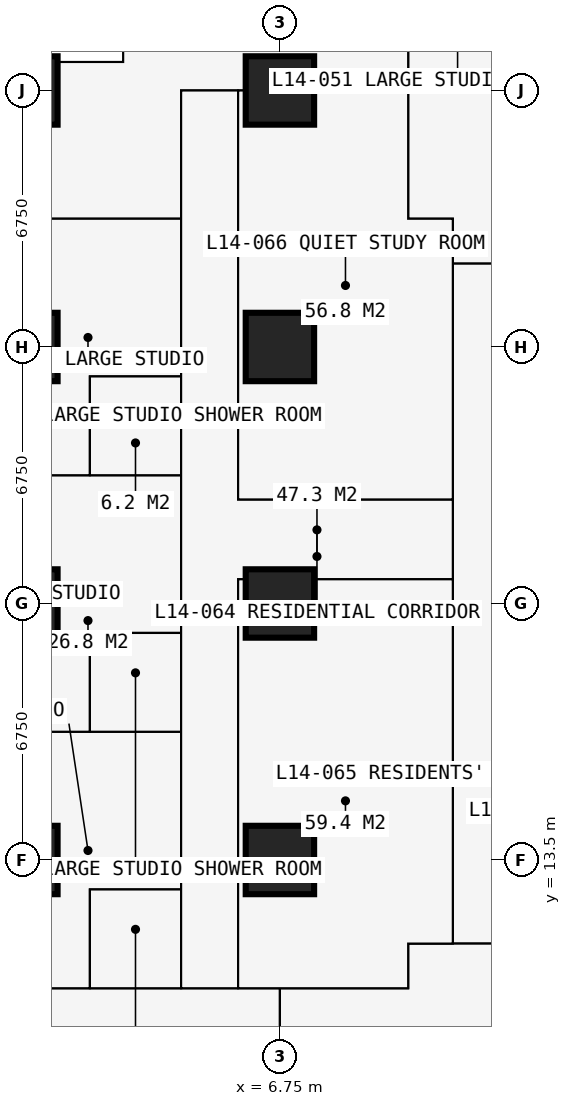
"""IFC4 building model, lengths in metres.
Left out: names, types, materials, properties, quantities, classifications, styles, units other than length and angle.
Written with IfcOpenShell. Run it as: python <this file> out.ifc"""

import sys

from ifc_helpers import new_model, si_unit, direction, frame, frame_2d, origin, origin_2d, place, context, subcontext, project, spatial, rectangle, extrude, element, fill, save


model = new_model("IFC4")
c1 = context("Model", 3, precision=1e-05, world=origin(), true_north=direction((0.0, 1.0)))
c2 = subcontext(c1, "Body", "Model", "MODEL_VIEW")
j1 = project(units=[si_unit("LENGTHUNIT", "METRE"), si_unit("PLANEANGLEUNIT", "RADIAN")], contexts=[c1])
p1 = place(None, origin())
s1 = spatial("IfcSite", under=j1, at=p1, CompositionType="ELEMENT")
p2 = place(p1, origin())
s2 = spatial("IfcBuilding", under=s1, at=p2, CompositionType="ELEMENT")
p3 = place(p2, frame((0.0, 0.0, 54.0)))
s3 = spatial("IfcBuildingStorey", under=s2, at=p3, CompositionType="ELEMENT", Elevation=54.0)
for number, where, z_axis, x_axis in (
    (1, (0.0, 13.5, 0.0), (0.0, 0.0, 1.0), (1.0, 0.0, 0.0)),
    (2, (0.0, 20.25, 0.0), (0.0, 0.0, 1.0), (1.0, 0.0, 0.0)),
    (3, (0.0, 27.0, 0.0), (0.0, 0.0, 1.0), (1.0, 0.0, 0.0)),
    (4, (0.0, 33.75, 0.0), (0.0, 0.0, 1.0), (1.0, 0.0, 0.0)),
    (5, (6.75, 13.5, 0.0), (0.0, 0.0, 1.0), (1.0, 0.0, 0.0)),
    (6, (6.75, 20.25, 0.0), (0.0, 0.0, 1.0), (1.0, 0.0, 0.0)),
    (7, (6.75, 27.0, 0.0), (0.0, 0.0, 1.0), (1.0, 0.0, 0.0)),
    (8, (6.75, 33.75, 0.0), (0.0, 0.0, 1.0), (1.0, 0.0, 0.0)),
):
    element("IfcColumn", number, at=place(p3, frame(where, z_axis=z_axis, x_axis=x_axis)), inside=s3, PredefinedType="COLUMN", context=c2, shape_type="SweptSolid", body=[
        extrude(rectangle(XDim=1.8, YDim=1.8, at=origin_2d()), origin(), (0.0, 0.0, 1.0), 3.6),
    ])
p4 = place(p3, frame((2.625, 37.875, 0.0), z_axis=(0.0, 0.0, 1.0), x_axis=(0.0, -1.0, 0.0)))
e9 = element("IfcWall", 9, at=p4, inside=s3, PredefinedType="SOLIDWALL", context=c2, shape_type="SweptSolid", body=[
    extrude(rectangle(XDim=3.375, YDim=0.3, at=frame_2d((1.688, 0.0))), origin(), (0.0, 0.0, 1.0), 3.375),
])
p5 = place(p4, frame((0.788, 0.0, 0.6)))
e10 = element("IfcOpeningElement", 10, at=p5, cuts=e9, PredefinedType="OPENING", context=c2, shape_type="SweptSolid", body=[
    extrude(rectangle(XDim=1.8, YDim=2.1, at=frame_2d((0.9, 1.05))), frame((0.0, 0.16, 0.0), z_axis=(0.0, -1.0, 0.0), x_axis=(1.0, 0.0, 0.0)), (0.0, 0.0, 1.0), 0.32),
])
p6 = place(p3, frame((2.625, 34.5, 0.0), z_axis=(0.0, 0.0, 1.0), x_axis=(-1.0, 0.0, 0.0)))
e11 = element("IfcWall", 11, at=p6, inside=s3, PredefinedType="SOLIDWALL", context=c2, shape_type="SweptSolid", body=[
    extrude(rectangle(XDim=3.375, YDim=0.3, at=frame_2d((1.688, 0.0))), origin(), (0.0, 0.0, 1.0), 3.375),
])
p7 = place(p6, frame((0.343, 0.0, 0.9)))
e12 = element("IfcOpeningElement", 12, at=p7, cuts=e11, PredefinedType="OPENING", context=c2, shape_type="SweptSolid", body=[
    extrude(rectangle(XDim=1.2, YDim=1.8, at=frame_2d((0.6, 0.9))), frame((0.0, 0.16, 0.0), z_axis=(0.0, -1.0, 0.0), x_axis=(1.0, 0.0, 0.0)), (0.0, 0.0, 1.0), 0.32),
])
p8 = place(p3, frame((-0.734, 10.125, 0.0), z_axis=(0.0, 0.0, 1.0), x_axis=(1.0, 0.0, 0.0)))
e13 = element("IfcWall", 13, at=p8, inside=s3, PredefinedType="PARTITIONING", context=c2, shape_type="SweptSolid", body=[
    extrude(rectangle(XDim=10.859, YDim=0.15, at=frame_2d((5.429, 0.0))), origin(), (0.0, 0.0, 1.0), 3.375),
])
p9 = place(p8, frame((5.134, 0.0, 0.0)))
e14 = element("IfcOpeningElement", 14, at=p9, cuts=e13, PredefinedType="OPENING", context=c2, shape_type="SweptSolid", body=[
    extrude(rectangle(XDim=1.0, YDim=2.2, at=frame_2d((0.5, 1.1))), frame((0.0, 0.085, 0.0), z_axis=(0.0, -1.0, 0.0), x_axis=(1.0, 0.0, 0.0)), (0.0, 0.0, 1.0), 0.17),
])
p10 = place(p3, frame((-0.734, 16.875, 0.0), z_axis=(0.0, 0.0, 1.0), x_axis=(1.0, 0.0, 0.0)))
e15 = element("IfcWall", 15, at=p10, inside=s3, PredefinedType="PARTITIONING", context=c2, shape_type="SweptSolid", body=[
    extrude(rectangle(XDim=4.884, YDim=0.175, at=frame_2d((2.442, 0.0))), origin(), (0.0, 0.0, 1.0), 3.375),
])
p11 = place(p10, frame((3.234, 0.0, 0.0)))
e16 = element("IfcOpeningElement", 16, at=p11, cuts=e15, PredefinedType="OPENING", context=c2, shape_type="SweptSolid", body=[
    extrude(rectangle(XDim=0.9, YDim=2.2, at=frame_2d((0.45, 1.1))), frame((0.0, 0.097, 0.0), z_axis=(0.0, -1.0, 0.0), x_axis=(1.0, 0.0, 0.0)), (0.0, 0.0, 1.0), 0.195),
])
p12 = place(p3, frame((-0.734, 23.625, 0.0), z_axis=(0.0, 0.0, 1.0), x_axis=(1.0, 0.0, 0.0)))
e17 = element("IfcWall", 17, at=p12, inside=s3, PredefinedType="PARTITIONING", context=c2, shape_type="SweptSolid", body=[
    extrude(rectangle(XDim=4.884, YDim=0.175, at=frame_2d((2.442, 0.0))), origin(), (0.0, 0.0, 1.0), 3.375),
])
p13 = place(p12, frame((3.234, 0.0, 0.0)))
e18 = element("IfcOpeningElement", 18, at=p13, cuts=e17, PredefinedType="OPENING", context=c2, shape_type="SweptSolid", body=[
    extrude(rectangle(XDim=0.9, YDim=2.2, at=frame_2d((0.45, 1.1))), frame((0.0, 0.097, 0.0), z_axis=(0.0, -1.0, 0.0), x_axis=(1.0, 0.0, 0.0)), (0.0, 0.0, 1.0), 0.195),
])
p14 = place(p3, frame((-0.734, 30.375, 0.0), z_axis=(0.0, 0.0, 1.0), x_axis=(1.0, 0.0, 0.0)))
e19 = element("IfcWall", 19, at=p14, inside=s3, PredefinedType="PARTITIONING", context=c2, shape_type="SweptSolid", body=[
    extrude(rectangle(XDim=4.884, YDim=0.15, at=frame_2d((2.442, 0.0))), origin(), (0.0, 0.0, 1.0), 3.375),
])
p15 = place(p3, frame((1.75, 10.125, 0.0), z_axis=(0.0, 0.0, 1.0), x_axis=(0.0, 1.0, 0.0)))
e20 = element("IfcWall", 20, at=p15, inside=s3, PredefinedType="PARTITIONING", context=c2, shape_type="SweptSolid", body=[
    extrude(rectangle(XDim=2.6, YDim=0.1, at=frame_2d((1.3, 0.0))), origin(), (0.0, 0.0, 1.0), 3.375),
])
p16 = place(p15, frame((0.85, 0.0, 0.0)))
e21 = element("IfcOpeningElement", 21, at=p16, cuts=e20, PredefinedType="OPENING", context=c2, shape_type="SweptSolid", body=[
    extrude(rectangle(XDim=0.9, YDim=2.2, at=frame_2d((0.45, 1.1))), frame((0.0, 0.06, 0.0), z_axis=(0.0, -1.0, 0.0), x_axis=(1.0, 0.0, 0.0)), (0.0, 0.0, 1.0), 0.12),
])
p17 = place(p3, frame((1.75, 12.725, 0.0), z_axis=(0.0, 0.0, 1.0), x_axis=(1.0, 0.0, 0.0)))
e22 = element("IfcWall", 22, at=p17, inside=s3, PredefinedType="PARTITIONING", context=c2, shape_type="SweptSolid", body=[
    extrude(rectangle(XDim=2.4, YDim=0.1, at=frame_2d((1.2, 0.0))), origin(), (0.0, 0.0, 1.0), 3.375),
])
p18 = place(p3, frame((1.75, 16.875, 0.0), z_axis=(0.0, 0.0, 1.0), x_axis=(0.0, 1.0, 0.0)))
e23 = element("IfcWall", 23, at=p18, inside=s3, PredefinedType="PARTITIONING", context=c2, shape_type="SweptSolid", body=[
    extrude(rectangle(XDim=2.6, YDim=0.1, at=frame_2d((1.3, 0.0))), origin(), (0.0, 0.0, 1.0), 3.375),
])
p19 = place(p3, frame((1.75, 19.475, 0.0), z_axis=(0.0, 0.0, 1.0), x_axis=(1.0, 0.0, 0.0)))
e24 = element("IfcWall", 24, at=p19, inside=s3, PredefinedType="PARTITIONING", context=c2, shape_type="SweptSolid", body=[
    extrude(rectangle(XDim=2.4, YDim=0.1, at=frame_2d((1.2, 0.0))), origin(), (0.0, 0.0, 1.0), 3.375),
])
p20 = place(p3, frame((1.75, 23.625, 0.0), z_axis=(0.0, 0.0, 1.0), x_axis=(0.0, 1.0, 0.0)))
e25 = element("IfcWall", 25, at=p20, inside=s3, PredefinedType="PARTITIONING", context=c2, shape_type="SweptSolid", body=[
    extrude(rectangle(XDim=2.6, YDim=0.1, at=frame_2d((1.3, 0.0))), origin(), (0.0, 0.0, 1.0), 3.375),
])
p21 = place(p3, frame((1.75, 26.225, 0.0), z_axis=(0.0, 0.0, 1.0), x_axis=(1.0, 0.0, 0.0)))
e26 = element("IfcWall", 26, at=p21, inside=s3, PredefinedType="PARTITIONING", context=c2, shape_type="SweptSolid", body=[
    extrude(rectangle(XDim=2.4, YDim=0.1, at=frame_2d((1.2, 0.0))), origin(), (0.0, 0.0, 1.0), 3.375),
])
p22 = place(p3, frame((4.15, 10.125, 0.0), z_axis=(0.0, 0.0, 1.0), x_axis=(0.0, 1.0, 0.0)))
e27 = element("IfcWall", 27, at=p22, inside=s3, PredefinedType="PARTITIONING", context=c2, shape_type="SweptSolid", body=[
    extrude(rectangle(XDim=23.625, YDim=0.15, at=frame_2d((11.812, 0.0))), origin(), (0.0, 0.0, 1.0), 3.375),
])
p23 = place(p22, frame((4.2, 0.0, 0.0)))
e28 = element("IfcOpeningElement", 28, at=p23, cuts=e27, PredefinedType="OPENING", context=c2, shape_type="SweptSolid", body=[
    extrude(rectangle(XDim=0.95, YDim=2.2, at=frame_2d((0.475, 1.1))), frame((0.0, 0.085, 0.0), z_axis=(0.0, -1.0, 0.0), x_axis=(1.0, 0.0, 0.0)), (0.0, 0.0, 1.0), 0.17),
])
p24 = place(p22, frame((10.95, 0.0, 0.0)))
e29 = element("IfcOpeningElement", 29, at=p24, cuts=e27, PredefinedType="OPENING", context=c2, shape_type="SweptSolid", body=[
    extrude(rectangle(XDim=0.95, YDim=2.2, at=frame_2d((0.475, 1.1))), frame((0.0, 0.085, 0.0), z_axis=(0.0, -1.0, 0.0), x_axis=(1.0, 0.0, 0.0)), (0.0, 0.0, 1.0), 0.17),
])
p25 = place(p22, frame((17.7, 0.0, 0.0)))
e30 = element("IfcOpeningElement", 30, at=p25, cuts=e27, PredefinedType="OPENING", context=c2, shape_type="SweptSolid", body=[
    extrude(rectangle(XDim=0.95, YDim=2.2, at=frame_2d((0.475, 1.1))), frame((0.0, 0.085, 0.0), z_axis=(0.0, -1.0, 0.0), x_axis=(1.0, 0.0, 0.0)), (0.0, 0.0, 1.0), 0.17),
])
p26 = place(p3, frame((4.15, 33.75, 0.0), z_axis=(0.0, 0.0, 1.0), x_axis=(1.0, 0.0, 0.0)))
e31 = element("IfcWall", 31, at=p26, inside=s3, PredefinedType="PARTITIONING", context=c2, shape_type="SweptSolid", body=[
    extrude(rectangle(XDim=5.975, YDim=0.15, at=frame_2d((2.988, 0.0))), origin(), (0.0, 0.0, 1.0), 2.877),
])
p27 = place(p3, frame((5.65, 10.125, 0.0), z_axis=(0.0, 0.0, 1.0), x_axis=(0.0, 1.0, 0.0)))
e32 = element("IfcWall", 32, at=p27, inside=s3, PredefinedType="PARTITIONING", context=c2, shape_type="SweptSolid", body=[
    extrude(rectangle(XDim=10.762, YDim=0.15, at=frame_2d((5.381, 0.0))), origin(), (0.0, 0.0, 1.0), 3.375),
])
p28 = place(p27, frame((4.9, 0.0, 0.0)))
e33 = element("IfcOpeningElement", 33, at=p28, cuts=e32, PredefinedType="OPENING", context=c2, shape_type="SweptSolid", body=[
    extrude(rectangle(XDim=0.95, YDim=2.2, at=frame_2d((0.475, 1.1))), frame((0.0, 0.085, 0.0), z_axis=(0.0, -1.0, 0.0), x_axis=(1.0, 0.0, 0.0)), (0.0, 0.0, 1.0), 0.17),
])
p29 = place(p3, frame((5.65, 20.887, 0.0), z_axis=(0.0, 0.0, 1.0), x_axis=(1.0, 0.0, 0.0)))
e34 = element("IfcWall", 34, at=p29, inside=s3, PredefinedType="PARTITIONING", context=c2, shape_type="SweptSolid", body=[
    extrude(rectangle(XDim=5.65, YDim=0.15, at=frame_2d((2.825, 0.0))), origin(), (0.0, 0.0, 1.0), 3.375),
])
p30 = place(p3, frame((5.65, 22.988, 0.0), z_axis=(0.0, 0.0, 1.0), x_axis=(0.0, 1.0, 0.0)))
e35 = element("IfcWall", 35, at=p30, inside=s3, PredefinedType="PARTITIONING", context=c2, shape_type="SweptSolid", body=[
    extrude(rectangle(XDim=10.762, YDim=0.15, at=frame_2d((5.381, 0.0))), origin(), (0.0, 0.0, 1.0), 3.375),
])
p31 = place(p30, frame((4.95, 0.0, 0.0)))
e36 = element("IfcOpeningElement", 36, at=p31, cuts=e35, PredefinedType="OPENING", context=c2, shape_type="SweptSolid", body=[
    extrude(rectangle(XDim=0.95, YDim=2.2, at=frame_2d((0.475, 1.1))), frame((0.0, 0.085, 0.0), z_axis=(0.0, -1.0, 0.0), x_axis=(1.0, 0.0, 0.0)), (0.0, 0.0, 1.0), 0.17),
])
p32 = place(p3, frame((5.65, 22.988, 0.0), z_axis=(0.0, 0.0, 1.0), x_axis=(1.0, 0.0, 0.0)))
e37 = element("IfcWall", 37, at=p32, inside=s3, PredefinedType="PARTITIONING", context=c2, shape_type="SweptSolid", body=[
    extrude(rectangle(XDim=5.65, YDim=0.15, at=frame_2d((2.825, 0.0))), origin(), (0.0, 0.0, 1.0), 3.375),
])
p33 = place(p3, frame((6.75, -0.734, 0.0), z_axis=(0.0, 0.0, 1.0), x_axis=(0.0, 1.0, 0.0)))
e38 = element("IfcWall", 38, at=p33, inside=s3, PredefinedType="PARTITIONING", context=c2, shape_type="SweptSolid", body=[
    extrude(rectangle(XDim=10.859, YDim=0.15, at=frame_2d((5.429, 0.0))), origin(), (0.0, 0.0, 1.0), 2.877),
])
p34 = place(p3, frame((10.125, 10.125, 0.0), z_axis=(0.0, 0.0, 1.0), x_axis=(0.0, 1.0, 0.0)))
e39 = element("IfcWall", 39, at=p34, inside=s3, PredefinedType="PARTITIONING", context=c2, shape_type="SweptSolid", body=[
    extrude(rectangle(XDim=1.175, YDim=0.15, at=frame_2d((0.587, 0.0))), origin(), (0.0, 0.0, 1.0), 3.375),
])
p35 = place(p3, frame((10.125, 11.3, 0.0), z_axis=(0.0, 0.0, 1.0), x_axis=(1.0, 0.0, 0.0)))
e40 = element("IfcWall", 40, at=p35, inside=s3, PredefinedType="PARTITIONING", context=c2, shape_type="SweptSolid", body=[
    extrude(rectangle(XDim=20.675, YDim=0.15, at=frame_2d((10.337, 0.0))), origin(), (0.0, 0.0, 1.0), 3.375),
])
p36 = place(p35, frame((1.775, 0.0, 0.0)))
e41 = element("IfcOpeningElement", 41, at=p36, cuts=e40, PredefinedType="OPENING", context=c2, shape_type="SweptSolid", body=[
    extrude(rectangle(XDim=1.0, YDim=2.2, at=frame_2d((0.5, 1.1))), frame((0.0, 0.085, 0.0), z_axis=(0.0, -1.0, 0.0), x_axis=(1.0, 0.0, 0.0)), (0.0, 0.0, 1.0), 0.17),
])
p37 = place(p35, frame((11.312, 0.0, 0.0)))
e42 = element("IfcOpeningElement", 42, at=p37, cuts=e40, PredefinedType="OPENING", context=c2, shape_type="SweptSolid", body=[
    extrude(rectangle(XDim=1.0, YDim=2.2, at=frame_2d((0.5, 1.1))), frame((0.0, 0.085, 0.0), z_axis=(0.0, -1.0, 0.0), x_axis=(1.0, 0.0, 0.0)), (0.0, 0.0, 1.0), 0.17),
])
p38 = place(p3, frame((10.125, 30.375, 0.0), z_axis=(0.0, 0.0, 1.0), x_axis=(0.0, 1.0, 0.0)))
e43 = element("IfcWall", 43, at=p38, inside=s3, PredefinedType="PARTITIONING", context=c2, shape_type="SweptSolid", body=[
    extrude(rectangle(XDim=10.859, YDim=0.15, at=frame_2d((5.429, 0.0))), origin(), (0.0, 0.0, 1.0), 3.375),
])
p39 = place(p38, frame((4.725, 0.0, 0.0)))
e44 = element("IfcOpeningElement", 44, at=p39, cuts=e43, PredefinedType="OPENING", context=c2, shape_type="SweptSolid", body=[
    extrude(rectangle(XDim=1.0, YDim=2.2, at=frame_2d((0.5, 1.1))), frame((0.0, 0.085, 0.0), z_axis=(0.0, -1.0, 0.0), x_axis=(1.0, 0.0, 0.0)), (0.0, 0.0, 1.0), 0.17),
])
p40 = place(p3, frame((10.125, 30.375, 0.0), z_axis=(0.0, 0.0, 1.0), x_axis=(1.0, 0.0, 0.0)))
e45 = element("IfcWall", 45, at=p40, inside=s3, PredefinedType="PARTITIONING", context=c2, shape_type="SweptSolid", body=[
    extrude(rectangle(XDim=1.175, YDim=0.15, at=frame_2d((0.587, 0.0))), origin(), (0.0, 0.0, 1.0), 3.375),
])
p41 = place(p3, frame((11.3, 11.3, 0.0), z_axis=(0.0, 0.0, 1.0), x_axis=(0.0, 1.0, 0.0)))
e46 = element("IfcWall", 46, at=p41, inside=s3, PredefinedType="PARTITIONING", context=c2, shape_type="SweptSolid", body=[
    extrude(rectangle(XDim=19.075, YDim=0.15, at=frame_2d((9.538, 0.0))), origin(), (0.0, 0.0, 1.0), 3.375),
])
p42 = place(p41, frame((10.137, 0.0, 0.0)))
e47 = element("IfcOpeningElement", 47, at=p42, cuts=e46, PredefinedType="OPENING", context=c2, shape_type="SweptSolid", body=[
    extrude(rectangle(XDim=1.0, YDim=2.2, at=frame_2d((0.5, 1.1))), frame((0.0, 0.085, 0.0), z_axis=(0.0, -1.0, 0.0), x_axis=(1.0, 0.0, 0.0)), (0.0, 0.0, 1.0), 0.17),
])
p43 = place(p3, frame((11.3, 29.2, 0.0), z_axis=(0.0, 0.0, 1.0), x_axis=(1.0, 0.0, 0.0)))
e48 = element("IfcWall", 48, at=p43, inside=s3, PredefinedType="PARTITIONING", context=c2, shape_type="SweptSolid", body=[
    extrude(rectangle(XDim=19.075, YDim=0.15, at=frame_2d((9.538, 0.0))), origin(), (0.0, 0.0, 1.0), 3.375),
])
p44 = place(p43, frame((12.875, 0.0, 0.0)))
e49 = element("IfcOpeningElement", 49, at=p44, cuts=e48, PredefinedType="OPENING", context=c2, shape_type="SweptSolid", body=[
    extrude(rectangle(XDim=1.0, YDim=2.2, at=frame_2d((0.5, 1.1))), frame((0.0, 0.085, 0.0), z_axis=(0.0, -1.0, 0.0), x_axis=(1.0, 0.0, 0.0)), (0.0, 0.0, 1.0), 0.17),
])
p45 = place(p43, frame((10.438, 0.0, 0.0)))
e50 = element("IfcOpeningElement", 50, at=p45, cuts=e48, PredefinedType="OPENING", context=c2, shape_type="SweptSolid", body=[
    extrude(rectangle(XDim=1.0, YDim=2.2, at=frame_2d((0.5, 1.1))), frame((0.0, 0.085, 0.0), z_axis=(0.0, -1.0, 0.0), x_axis=(1.0, 0.0, 0.0)), (0.0, 0.0, 1.0), 0.17),
])
p46 = place(p43, frame((14.875, 0.0, 0.0)))
e51 = element("IfcOpeningElement", 51, at=p46, cuts=e48, PredefinedType="OPENING", context=c2, shape_type="SweptSolid", body=[
    extrude(rectangle(XDim=0.95, YDim=2.2, at=frame_2d((0.475, 1.1))), frame((0.0, 0.085, 0.0), z_axis=(0.0, -1.0, 0.0), x_axis=(1.0, 0.0, 0.0)), (0.0, 0.0, 1.0), 0.17),
])
p47 = place(p7, origin())
e52 = element("IfcWindow", 52, at=p47, inside=s3, PartitioningType="SINGLE_PANEL", PredefinedType="WINDOW", context=c2, shape_type="SweptSolid", body=[
    extrude(rectangle(XDim=1.2, YDim=1.8, at=frame_2d((0.6, 0.9))), frame((0.0, 0.03, 0.0), z_axis=(0.0, -1.0, 0.0), x_axis=(1.0, 0.0, 0.0)), (0.0, 0.0, 1.0), 0.06),
])
fill(e12, e52)
p48 = place(p9, origin())
e53 = element("IfcDoor", 53, at=p48, inside=s3, OperationType="SINGLE_SWING_LEFT", PredefinedType="DOOR", context=c2, shape_type="SweptSolid", body=[
    extrude(rectangle(XDim=1.0, YDim=2.2, at=frame_2d((0.5, 1.1))), frame((0.0, 0.025, 0.0), z_axis=(0.0, -1.0, 0.0), x_axis=(1.0, 0.0, 0.0)), (0.0, 0.0, 1.0), 0.05),
])
fill(e14, e53)
p49 = place(p36, origin())
e54 = element("IfcDoor", 54, at=p49, inside=s3, OperationType="SINGLE_SWING_LEFT", PredefinedType="DOOR", context=c2, shape_type="SweptSolid", body=[
    extrude(rectangle(XDim=1.0, YDim=2.2, at=frame_2d((0.5, 1.1))), frame((0.0, 0.025, 0.0), z_axis=(0.0, -1.0, 0.0), x_axis=(1.0, 0.0, 0.0)), (0.0, 0.0, 1.0), 0.05),
])
fill(e41, e54)
p50 = place(p23, origin())
e55 = element("IfcDoor", 55, at=p50, inside=s3, OperationType="SINGLE_SWING_LEFT", PredefinedType="DOOR", context=c2, shape_type="SweptSolid", body=[
    extrude(rectangle(XDim=0.95, YDim=2.2, at=frame_2d((0.475, 1.1))), frame((0.0, 0.025, 0.0), z_axis=(0.0, -1.0, 0.0), x_axis=(1.0, 0.0, 0.0)), (0.0, 0.0, 1.0), 0.05),
])
fill(e28, e55)
p51 = place(p16, origin())
e56 = element("IfcDoor", 56, at=p51, inside=s3, OperationType="SINGLE_SWING_RIGHT", PredefinedType="DOOR", context=c2, shape_type="SweptSolid", body=[
    extrude(rectangle(XDim=0.9, YDim=2.2, at=frame_2d((0.45, 1.1))), frame((0.0, 0.025, 0.0), z_axis=(0.0, -1.0, 0.0), x_axis=(1.0, 0.0, 0.0)), (0.0, 0.0, 1.0), 0.05),
])
fill(e21, e56)
p52 = place(p24, origin())
e57 = element("IfcDoor", 57, at=p52, inside=s3, OperationType="SINGLE_SWING_LEFT", PredefinedType="DOOR", context=c2, shape_type="SweptSolid", body=[
    extrude(rectangle(XDim=0.95, YDim=2.2, at=frame_2d((0.475, 1.1))), frame((0.0, 0.025, 0.0), z_axis=(0.0, -1.0, 0.0), x_axis=(1.0, 0.0, 0.0)), (0.0, 0.0, 1.0), 0.05),
])
fill(e29, e57)
p53 = place(p11, origin())
e58 = element("IfcDoor", 58, at=p53, inside=s3, OperationType="SINGLE_SWING_RIGHT", PredefinedType="DOOR", context=c2, shape_type="SweptSolid", body=[
    extrude(rectangle(XDim=0.9, YDim=2.2, at=frame_2d((0.45, 1.1))), frame((0.0, 0.025, 0.0), z_axis=(0.0, -1.0, 0.0), x_axis=(1.0, 0.0, 0.0)), (0.0, 0.0, 1.0), 0.05),
])
fill(e16, e58)
p54 = place(p25, origin())
e59 = element("IfcDoor", 59, at=p54, inside=s3, OperationType="SINGLE_SWING_LEFT", PredefinedType="DOOR", context=c2, shape_type="SweptSolid", body=[
    extrude(rectangle(XDim=0.95, YDim=2.2, at=frame_2d((0.475, 1.1))), frame((0.0, 0.025, 0.0), z_axis=(0.0, -1.0, 0.0), x_axis=(1.0, 0.0, 0.0)), (0.0, 0.0, 1.0), 0.05),
])
fill(e30, e59)
p55 = place(p13, origin())
e60 = element("IfcDoor", 60, at=p55, inside=s3, OperationType="SINGLE_SWING_RIGHT", PredefinedType="DOOR", context=c2, shape_type="SweptSolid", body=[
    extrude(rectangle(XDim=0.9, YDim=2.2, at=frame_2d((0.45, 1.1))), frame((0.0, 0.025, 0.0), z_axis=(0.0, -1.0, 0.0), x_axis=(1.0, 0.0, 0.0)), (0.0, 0.0, 1.0), 0.05),
])
fill(e18, e60)
p56 = place(p42, origin())
e61 = element("IfcDoor", 61, at=p56, inside=s3, OperationType="SINGLE_SWING_LEFT", PredefinedType="DOOR", context=c2, shape_type="SweptSolid", body=[
    extrude(rectangle(XDim=1.0, YDim=2.2, at=frame_2d((0.5, 1.1))), frame((0.0, 0.025, 0.0), z_axis=(0.0, -1.0, 0.0), x_axis=(1.0, 0.0, 0.0)), (0.0, 0.0, 1.0), 0.05),
])
fill(e47, e61)
p57 = place(p28, origin())
e62 = element("IfcDoor", 62, at=p57, inside=s3, OperationType="SINGLE_SWING_LEFT", PredefinedType="DOOR", context=c2, shape_type="SweptSolid", body=[
    extrude(rectangle(XDim=0.95, YDim=2.2, at=frame_2d((0.475, 1.1))), frame((0.0, 0.025, 0.0), z_axis=(0.0, -1.0, 0.0), x_axis=(1.0, 0.0, 0.0)), (0.0, 0.0, 1.0), 0.05),
])
fill(e33, e62)
p58 = place(p31, origin())
e63 = element("IfcDoor", 63, at=p58, inside=s3, OperationType="SINGLE_SWING_LEFT", PredefinedType="DOOR", context=c2, shape_type="SweptSolid", body=[
    extrude(rectangle(XDim=0.95, YDim=2.2, at=frame_2d((0.475, 1.1))), frame((0.0, 0.025, 0.0), z_axis=(0.0, -1.0, 0.0), x_axis=(1.0, 0.0, 0.0)), (0.0, 0.0, 1.0), 0.05),
])
fill(e36, e63)
save(model, sys.argv[1])
